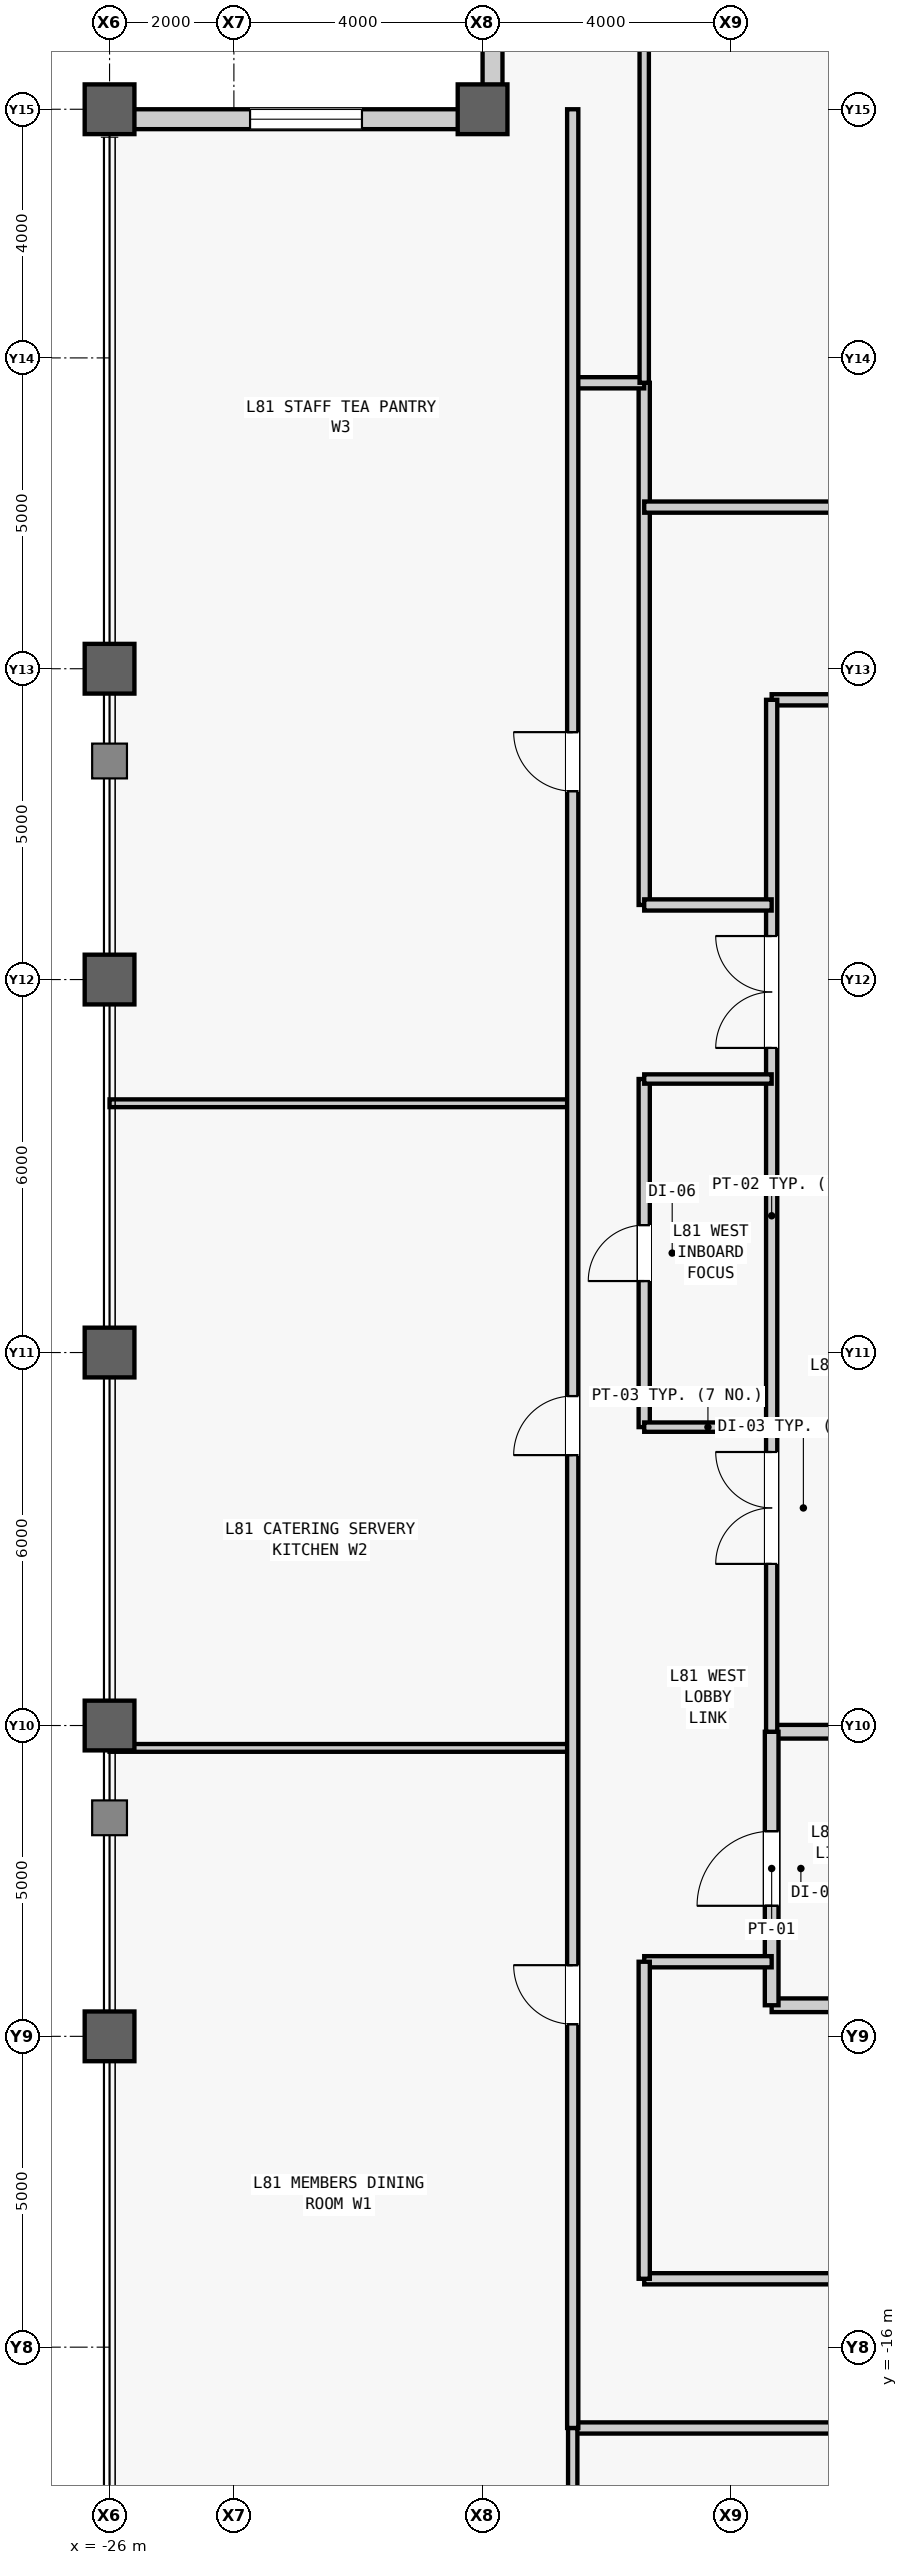
"""IFC4 building model, lengths in metres.
Left out: names, types, materials, properties, quantities, classifications, styles, units other than length and angle.
Written with IfcOpenShell. Run it as: python <this file> out.ifc"""

import sys

from ifc_helpers import new_model, si_unit, direction, frame, frame_2d, origin, origin_2d, place, context, subcontext, project, spatial, rectangle, hollow_rectangle, extrude, source, transform, mapped, element, fill, save


model = new_model("IFC4")
c1 = context("Model", 3, precision=1e-05, world=origin(), true_north=direction((0.0, 1.0)))
c2 = subcontext(c1, "Body", "Model", "MODEL_VIEW")
j1 = project(units=[si_unit("LENGTHUNIT", "METRE"), si_unit("PLANEANGLEUNIT", "RADIAN")], contexts=[c1])
p1 = place(None, origin())
s1 = spatial("IfcSite", under=j1, at=p1, CompositionType="ELEMENT")
p2 = place(p1, origin())
s2 = spatial("IfcBuilding", under=s1, at=p2, CompositionType="ELEMENT")
p3 = place(p2, frame((0.0, 0.0, 342.3)))
s3 = spatial("IfcBuildingStorey", under=s2, at=p3, CompositionType="ELEMENT", Elevation=342.3)
m1 = source(origin(), c2, "Body", "SweptSolid", [
    extrude(hollow_rectangle(XDim=0.8, YDim=0.8, WallThickness=0.045, at=origin_2d()), origin(), (0.0, 0.0, 1.0), 4.0),
])
for number, where, z_axis, x_axis in (
    (1, (-26.0, -11.0, 0.0), (0.0, 0.0, 1.0), (1.0, 0.0, 0.0)),
    (2, (-26.0, -6.0, 0.0), (0.0, 0.0, 1.0), (1.0, 0.0, 0.0)),
    (3, (-26.0, 0.0, 0.0), (0.0, 0.0, 1.0), (1.0, 0.0, 0.0)),
    (4, (-26.0, 6.0, 0.0), (0.0, 0.0, 1.0), (1.0, 0.0, 0.0)),
    (5, (-26.0, 11.0, 0.0), (0.0, 0.0, 1.0), (1.0, 0.0, 0.0)),
    (6, (-26.0, 20.0, 0.0), (0.0, 0.0, 1.0), (1.0, 0.0, 0.0)),
    (7, (-20.0, 20.0, 0.0), (0.0, 0.0, 1.0), (1.0, 0.0, 0.0)),
):
    element("IfcColumn", number, at=place(p3, frame(where, z_axis=z_axis, x_axis=x_axis)), inside=s3, PredefinedType="COLUMN", context=c2, shape_type="MappedRepresentation", body=[
        mapped(m1, transform((0.0, 0.0, 0.0), scale=1.0)),
    ])
m2 = source(origin(), c2, "Body", "SweptSolid", [
    extrude(rectangle(XDim=5.68, YDim=0.32, at=frame_2d((2.84, 0.0))), origin(), (0.0, 0.0, 1.0), 3.151),
])
p4 = place(p3, frame((-19.84, 20.0, 0.0), z_axis=(0.0, 0.0, 1.0), x_axis=(0.0, 1.0, 0.0)))
e8 = element("IfcWall", 8, at=p4, inside=s3, PredefinedType="STANDARD", context=c2, shape_type="MappedRepresentation", body=[
    mapped(m2, transform((0.0, 0.0, 0.0), scale=1.0)),
])
m3 = source(origin(), c2, "Body", "SweptSolid", [
    extrude(rectangle(XDim=1.8, YDim=2.4, at=frame_2d((0.9, 1.2))), frame((0.0, 0.17, 0.0), z_axis=(0.0, -1.0, 0.0), x_axis=(1.0, 0.0, 0.0)), (0.0, 0.0, 1.0), 0.34),
])
p5 = place(p4, frame((1.94, 0.0, 0.5)))
e9 = element("IfcOpeningElement", 9, at=p5, cuts=e8, PredefinedType="OPENING", context=c2, shape_type="MappedRepresentation", body=[
    mapped(m3, transform((0.0, 0.0, 0.0), scale=1.0)),
])
p6 = place(p3, frame((-20.0, 19.84, 0.0), z_axis=(0.0, 0.0, 1.0), x_axis=(-1.0, 0.0, 0.0)))
e10 = element("IfcWall", 10, at=p6, inside=s3, PredefinedType="STANDARD", context=c2, shape_type="MappedRepresentation", body=[
    mapped(m2, transform((0.0, 0.0, 0.0), scale=1.0)),
])
p7 = place(p6, frame((1.94, 0.0, 0.5)))
e11 = element("IfcOpeningElement", 11, at=p7, cuts=e10, PredefinedType="OPENING", context=c2, shape_type="MappedRepresentation", body=[
    mapped(m3, transform((0.0, 0.0, 0.0), scale=1.0)),
])
m4 = source(origin(), c2, "Body", "SweptSolid", [
    extrude(rectangle(XDim=4.05, YDim=0.22, at=frame_2d((2.025, 0.0))), origin(), (0.0, 0.0, 1.0), 3.7),
])
p8 = place(p3, frame((-15.35, -10.5, 0.0), z_axis=(0.0, 0.0, 1.0), x_axis=(1.0, 0.0, 0.0)))
e12 = element("IfcWall", 12, at=p8, inside=s3, PredefinedType="PARTITIONING", context=c2, shape_type="MappedRepresentation", body=[
    mapped(m4, transform((0.0, 0.0, 0.0), scale=1.0)),
])
m5 = source(origin(), c2, "Body", "SweptSolid", [
    extrude(rectangle(XDim=4.05, YDim=0.22, at=frame_2d((2.025, 0.0))), origin(), (0.0, 0.0, 1.0), 3.084),
])
p9 = place(p3, frame((-15.35, -6.1, 0.0), z_axis=(0.0, 0.0, 1.0), x_axis=(1.0, 0.0, 0.0)))
e13 = element("IfcWall", 13, at=p9, inside=s3, PredefinedType="PARTITIONING", context=c2, shape_type="MappedRepresentation", body=[
    mapped(m5, transform((0.0, 0.0, 0.0), scale=1.0)),
])
m6 = source(origin(), c2, "Body", "SweptSolid", [
    extrude(rectangle(XDim=4.4, YDim=0.22, at=frame_2d((2.2, 0.0))), origin(), (0.0, 0.0, 1.0), 3.7),
])
p10 = place(p3, frame((-15.35, -10.5, 0.0), z_axis=(0.0, 0.0, 1.0), x_axis=(0.0, 1.0, 0.0)))
e14 = element("IfcWall", 14, at=p10, inside=s3, PredefinedType="PARTITIONING", context=c2, shape_type="MappedRepresentation", body=[
    mapped(m6, transform((0.0, 0.0, 0.0), scale=1.0)),
])
m7 = source(origin(), c2, "Body", "SweptSolid", [
    extrude(rectangle(XDim=1.2, YDim=2.2, at=frame_2d((0.6, 1.1))), frame((0.0, 0.12, 0.0), z_axis=(0.0, -1.0, 0.0), x_axis=(1.0, 0.0, 0.0)), (0.0, 0.0, 1.0), 0.24),
])
p11 = place(p10, frame((1.6, 0.0, 0.0)))
e15 = element("IfcOpeningElement", 15, at=p11, cuts=e14, PredefinedType="OPENING", context=c2, shape_type="MappedRepresentation", body=[
    mapped(m7, transform((0.0, 0.0, 0.0), scale=1.0)),
])
m8 = source(origin(), c2, "Body", "SweptSolid", [
    extrude(rectangle(XDim=4.05, YDim=0.18, at=frame_2d((2.025, 0.0))), origin(), (0.0, 0.0, 1.0), 3.7),
])
p12 = place(p3, frame((-15.35, 10.5, 0.0), z_axis=(0.0, 0.0, 1.0), x_axis=(1.0, 0.0, 0.0)))
e16 = element("IfcWall", 16, at=p12, inside=s3, PredefinedType="PARTITIONING", context=c2, shape_type="MappedRepresentation", body=[
    mapped(m8, transform((0.0, 0.0, 0.0), scale=1.0)),
])
m9 = source(origin(), c2, "Body", "SweptSolid", [
    extrude(rectangle(XDim=16.6, YDim=0.18, at=frame_2d((8.3, 0.0))), origin(), (0.0, 0.0, 1.0), 3.7),
])
p13 = place(p3, frame((-15.35, -6.1, 0.0), z_axis=(0.0, 0.0, 1.0), x_axis=(0.0, 1.0, 0.0)))
e17 = element("IfcWall", 17, at=p13, inside=s3, PredefinedType="PARTITIONING", context=c2, shape_type="MappedRepresentation", body=[
    mapped(m9, transform((0.0, 0.0, 0.0), scale=1.0)),
])
m10 = source(origin(), c2, "Body", "SweptSolid", [
    extrude(rectangle(XDim=1.8, YDim=2.25, at=frame_2d((0.9, 1.125))), frame((0.0, 0.1, 0.0), z_axis=(0.0, -1.0, 0.0), x_axis=(1.0, 0.0, 0.0)), (0.0, 0.0, 1.0), 0.2),
])
p14 = place(p13, frame((2.7, 0.0, 0.0)))
e18 = element("IfcOpeningElement", 18, at=p14, cuts=e17, PredefinedType="OPENING", context=c2, shape_type="MappedRepresentation", body=[
    mapped(m10, transform((0.0, 0.0, 0.0), scale=1.0)),
])
p15 = place(p13, frame((11.0, 0.0, 0.0)))
e19 = element("IfcOpeningElement", 19, at=p15, cuts=e17, PredefinedType="OPENING", context=c2, shape_type="MappedRepresentation", body=[
    mapped(m10, transform((0.0, 0.0, 0.0), scale=1.0)),
])
m11 = source(origin(), c2, "Body", "SweptSolid", [
    extrude(rectangle(XDim=5.6, YDim=0.18, at=frame_2d((2.8, 0.0))), origin(), (0.0, 0.0, 1.0), 3.7),
])
p16 = place(p3, frame((-17.4, -1.2, 0.0), z_axis=(0.0, 0.0, 1.0), x_axis=(0.0, 1.0, 0.0)))
e20 = element("IfcWall", 20, at=p16, inside=s3, PredefinedType="PARTITIONING", context=c2, shape_type="MappedRepresentation", body=[
    mapped(m11, transform((0.0, 0.0, 0.0), scale=1.0)),
])
m12 = source(origin(), c2, "Body", "SweptSolid", [
    extrude(rectangle(XDim=0.9, YDim=2.15, at=frame_2d((0.45, 1.075))), frame((0.0, 0.1, 0.0), z_axis=(0.0, -1.0, 0.0), x_axis=(1.0, 0.0, 0.0)), (0.0, 0.0, 1.0), 0.2),
])
p17 = place(p16, frame((2.35, 0.0, 0.0)))
e21 = element("IfcOpeningElement", 21, at=p17, cuts=e20, PredefinedType="OPENING", context=c2, shape_type="MappedRepresentation", body=[
    mapped(m12, transform((0.0, 0.0, 0.0), scale=1.0)),
])
m13 = source(origin(), c2, "Body", "SweptSolid", [
    extrude(rectangle(XDim=2.05, YDim=0.15, at=frame_2d((1.025, 0.0))), origin(), (0.0, 0.0, 1.0), 3.7),
])
for number, where, z_axis, x_axis in (
    (22, (-17.4, -1.2, 0.0), (0.0, 0.0, 1.0), (1.0, 0.0, 0.0)),
    (23, (-17.4, 4.4, 0.0), (0.0, 0.0, 1.0), (1.0, 0.0, 0.0)),
):
    element("IfcWall", number, at=place(p3, frame(where, z_axis=z_axis, x_axis=x_axis)), inside=s3, PredefinedType="PARTITIONING", context=c2, shape_type="MappedRepresentation", body=[
        mapped(m13, transform((0.0, 0.0, 0.0), scale=1.0)),
    ])
m14 = source(origin(), c2, "Body", "SweptSolid", [
    extrude(rectangle(XDim=2.05, YDim=0.18, at=frame_2d((1.025, 0.0))), origin(), (0.0, 0.0, 1.0), 3.7),
])
p18 = place(p3, frame((-17.4, -9.8, 0.0), z_axis=(0.0, 0.0, 1.0), x_axis=(1.0, 0.0, 0.0)))
e24 = element("IfcWall", 24, at=p18, inside=s3, PredefinedType="PARTITIONING", context=c2, shape_type="MappedRepresentation", body=[
    mapped(m14, transform((0.0, 0.0, 0.0), scale=1.0)),
])
m15 = source(origin(), c2, "Body", "SweptSolid", [
    extrude(rectangle(XDim=8.4, YDim=0.18, at=frame_2d((4.2, 0.0))), origin(), (0.0, 0.0, 1.0), 3.7),
])
p19 = place(p3, frame((-17.4, 7.2, 0.0), z_axis=(0.0, 0.0, 1.0), x_axis=(0.0, 1.0, 0.0)))
e25 = element("IfcWall", 25, at=p19, inside=s3, PredefinedType="PARTITIONING", context=c2, shape_type="MappedRepresentation", body=[
    mapped(m15, transform((0.0, 0.0, 0.0), scale=1.0)),
])
p20 = place(p3, frame((-17.4, 7.2, 0.0), z_axis=(0.0, 0.0, 1.0), x_axis=(1.0, 0.0, 0.0)))
e26 = element("IfcWall", 26, at=p20, inside=s3, PredefinedType="PARTITIONING", context=c2, shape_type="MappedRepresentation", body=[
    mapped(m14, transform((0.0, 0.0, 0.0), scale=1.0)),
])
m16 = source(origin(), c2, "Body", "SweptSolid", [
    extrude(rectangle(XDim=16.1, YDim=0.18, at=frame_2d((8.05, 0.0))), origin(), (0.0, 0.0, 1.0), 3.7),
])
p21 = place(p3, frame((-17.4, -14.9, 0.0), z_axis=(0.0, 0.0, 1.0), x_axis=(1.0, 0.0, 0.0)))
e27 = element("IfcWall", 27, at=p21, inside=s3, PredefinedType="PARTITIONING", context=c2, shape_type="MappedRepresentation", body=[
    mapped(m16, transform((0.0, 0.0, 0.0), scale=1.0)),
])
p22 = place(p21, frame((8.95, 0.0, 0.0)))
e28 = element("IfcOpeningElement", 28, at=p22, cuts=e27, PredefinedType="OPENING", context=c2, shape_type="MappedRepresentation", body=[
    mapped(m12, transform((0.0, 0.0, 0.0), scale=1.0)),
])
m17 = source(origin(), c2, "Body", "SweptSolid", [
    extrude(rectangle(XDim=5.1, YDim=0.18, at=frame_2d((2.55, 0.0))), origin(), (0.0, 0.0, 1.0), 3.7),
])
p23 = place(p3, frame((-17.4, -14.9, 0.0), z_axis=(0.0, 0.0, 1.0), x_axis=(0.0, 1.0, 0.0)))
e29 = element("IfcWall", 29, at=p23, inside=s3, PredefinedType="PARTITIONING", context=c2, shape_type="MappedRepresentation", body=[
    mapped(m17, transform((0.0, 0.0, 0.0), scale=1.0)),
])
m18 = source(origin(), c2, "Body", "SweptSolid", [
    extrude(rectangle(XDim=1.15, YDim=0.18, at=frame_2d((0.575, 0.0))), origin(), (0.0, 0.0, 1.0), 3.7),
])
p24 = place(p3, frame((-18.55, 15.6, 0.0), z_axis=(0.0, 0.0, 1.0), x_axis=(1.0, 0.0, 0.0)))
e30 = element("IfcWall", 30, at=p24, inside=s3, PredefinedType="PARTITIONING", context=c2, shape_type="MappedRepresentation", body=[
    mapped(m18, transform((0.0, 0.0, 0.0), scale=1.0)),
])
m19 = source(origin(), c2, "Body", "SweptSolid", [
    extrude(rectangle(XDim=36.3, YDim=0.18, at=frame_2d((18.15, 0.0))), origin(), (0.0, 0.0, 1.0), 3.7),
])
p25 = place(p3, frame((-18.55, -17.3, 0.0), z_axis=(0.0, 0.0, 1.0), x_axis=(1.0, 0.0, 0.0)))
e31 = element("IfcWall", 31, at=p25, inside=s3, PredefinedType="PARTITIONING", context=c2, shape_type="MappedRepresentation", body=[
    mapped(m19, transform((0.0, 0.0, 0.0), scale=1.0)),
])
m20 = source(origin(), c2, "Body", "SweptSolid", [
    extrude(rectangle(XDim=1.05, YDim=2.2, at=frame_2d((0.525, 1.1))), frame((0.0, 0.1, 0.0), z_axis=(0.0, -1.0, 0.0), x_axis=(1.0, 0.0, 0.0)), (0.0, 0.0, 1.0), 0.2),
])
p26 = place(p25, frame((9.05, 0.0, 0.0)))
e32 = element("IfcOpeningElement", 32, at=p26, cuts=e31, PredefinedType="OPENING", context=c2, shape_type="MappedRepresentation", body=[
    mapped(m20, transform((0.0, 0.0, 0.0), scale=1.0)),
])
p27 = place(p25, frame((26.175, 0.0, 0.0)))
e33 = element("IfcOpeningElement", 33, at=p27, cuts=e31, PredefinedType="OPENING", context=c2, shape_type="MappedRepresentation", body=[
    mapped(m20, transform((0.0, 0.0, 0.0), scale=1.0)),
])
m21 = source(origin(), c2, "Body", "SweptSolid", [
    extrude(rectangle(XDim=8.7, YDim=0.15, at=frame_2d((4.35, 0.0))), origin(), (0.0, 0.0, 1.0), 3.7),
])
p28 = place(p3, frame((-18.55, -26.0, 0.0), z_axis=(0.0, 0.0, 1.0), x_axis=(0.0, 1.0, 0.0)))
e34 = element("IfcWall", 34, at=p28, inside=s3, PredefinedType="PARTITIONING", context=c2, shape_type="MappedRepresentation", body=[
    mapped(m21, transform((0.0, 0.0, 0.0), scale=1.0)),
])
m22 = source(origin(), c2, "Body", "SweptSolid", [
    extrude(rectangle(XDim=32.75, YDim=0.18, at=frame_2d((16.375, 0.0))), origin(), (0.0, 0.0, 1.0), 3.7),
])
p29 = place(p3, frame((-17.4, 13.6, 0.0), z_axis=(0.0, 0.0, 1.0), x_axis=(1.0, 0.0, 0.0)))
e35 = element("IfcWall", 35, at=p29, inside=s3, PredefinedType="PARTITIONING", context=c2, shape_type="MappedRepresentation", body=[
    mapped(m22, transform((0.0, 0.0, 0.0), scale=1.0)),
])
p30 = place(p29, frame((27.075, 0.0, 0.0)))
e36 = element("IfcOpeningElement", 36, at=p30, cuts=e35, PredefinedType="OPENING", context=c2, shape_type="MappedRepresentation", body=[
    mapped(m20, transform((0.0, 0.0, 0.0), scale=1.0)),
])
m23 = source(origin(), c2, "Body", "SweptSolid", [
    extrude(rectangle(XDim=10.4, YDim=0.15, at=frame_2d((5.2, 0.0))), origin(), (0.0, 0.0, 1.0), 3.7),
])
p31 = place(p3, frame((-17.4, 15.6, 0.0), z_axis=(0.0, 0.0, 1.0), x_axis=(0.0, 1.0, 0.0)))
e37 = element("IfcWall", 37, at=p31, inside=s3, PredefinedType="PARTITIONING", context=c2, shape_type="MappedRepresentation", body=[
    mapped(m23, transform((0.0, 0.0, 0.0), scale=1.0)),
])
m24 = source(origin(), c2, "Body", "SweptSolid", [
    extrude(rectangle(XDim=7.45, YDim=0.125, at=frame_2d((3.725, 0.0))), origin(), (0.0, 0.0, 1.0), 3.7),
])
for number, where, z_axis, x_axis in (
    (38, (-26.0, -6.36, 0.0), (0.0, 0.0, 1.0), (1.0, 0.0, 0.0)),
    (39, (-26.0, 4.01, 0.0), (0.0, 0.0, 1.0), (1.0, 0.0, 0.0)),
):
    element("IfcWall", number, at=place(p3, frame(where, z_axis=z_axis, x_axis=x_axis)), inside=s3, PredefinedType="PARTITIONING", context=c2, shape_type="MappedRepresentation", body=[
        mapped(m24, transform((0.0, 0.0, 0.0), scale=1.0)),
    ])
m25 = source(origin(), c2, "Body", "SweptSolid", [
    extrude(rectangle(XDim=37.3, YDim=0.18, at=frame_2d((18.65, 0.0))), origin(), (0.0, 0.0, 1.0), 3.7),
])
p32 = place(p3, frame((-18.55, -17.3, 0.0), z_axis=(0.0, 0.0, 1.0), x_axis=(0.0, 1.0, 0.0)))
e40 = element("IfcWall", 40, at=p32, inside=s3, PredefinedType="PARTITIONING", context=c2, shape_type="MappedRepresentation", body=[
    mapped(m25, transform((0.0, 0.0, 0.0), scale=1.0)),
])
m26 = source(origin(), c2, "Body", "SweptSolid", [
    extrude(rectangle(XDim=0.95, YDim=2.15, at=frame_2d((0.475, 1.075))), frame((0.0, 0.1, 0.0), z_axis=(0.0, -1.0, 0.0), x_axis=(1.0, 0.0, 0.0)), (0.0, 0.0, 1.0), 0.2),
])
p33 = place(p32, frame((6.495, 0.0, 0.0)))
e41 = element("IfcOpeningElement", 41, at=p33, cuts=e40, PredefinedType="OPENING", context=c2, shape_type="MappedRepresentation", body=[
    mapped(m26, transform((0.0, 0.0, 0.0), scale=1.0)),
])
p34 = place(p32, frame((15.65, 0.0, 0.0)))
e42 = element("IfcOpeningElement", 42, at=p34, cuts=e40, PredefinedType="OPENING", context=c2, shape_type="MappedRepresentation", body=[
    mapped(m26, transform((0.0, 0.0, 0.0), scale=1.0)),
])
p35 = place(p32, frame((26.33, 0.0, 0.0)))
e43 = element("IfcOpeningElement", 43, at=p35, cuts=e40, PredefinedType="OPENING", context=c2, shape_type="MappedRepresentation", body=[
    mapped(m26, transform((0.0, 0.0, 0.0), scale=1.0)),
])
m27 = source(origin(), c2, "Body", "SweptSolid", [
    extrude(rectangle(XDim=1.8, YDim=2.4, at=frame_2d((0.9, 1.2))), frame((0.0, 0.03, 0.0), z_axis=(0.0, -1.0, 0.0), x_axis=(1.0, 0.0, 0.0)), (0.0, 0.0, 1.0), 0.06),
])
p36 = place(p7, origin())
e44 = element("IfcWindow", 44, at=p36, inside=s3, PartitioningType="SINGLE_PANEL", PredefinedType="WINDOW", context=c2, shape_type="MappedRepresentation", body=[
    mapped(m27, transform((0.0, 0.0, 0.0), scale=1.0)),
])
fill(e11, e44)
m28 = source(origin(), c2, "Body", "SweptSolid", [
    extrude(rectangle(XDim=1.2, YDim=2.2, at=frame_2d((0.6, 1.1))), frame((0.0, 0.025, 0.0), z_axis=(0.0, -1.0, 0.0), x_axis=(1.0, 0.0, 0.0)), (0.0, 0.0, 1.0), 0.05),
])
p37 = place(p11, origin())
e45 = element("IfcDoor", 45, at=p37, inside=s3, OperationType="SINGLE_SWING_LEFT", PredefinedType="DOOR", context=c2, shape_type="MappedRepresentation", body=[
    mapped(m28, transform((0.0, 0.0, 0.0), scale=1.0)),
])
fill(e15, e45)
m29 = source(origin(), c2, "Body", "SweptSolid", [
    extrude(rectangle(XDim=1.8, YDim=2.25, at=frame_2d((0.9, 1.125))), frame((0.0, 0.025, 0.0), z_axis=(0.0, -1.0, 0.0), x_axis=(1.0, 0.0, 0.0)), (0.0, 0.0, 1.0), 0.05),
])
p38 = place(p14, origin())
e46 = element("IfcDoor", 46, at=p38, inside=s3, OperationType="SINGLE_SWING_LEFT", PredefinedType="DOOR", context=c2, shape_type="MappedRepresentation", body=[
    mapped(m29, transform((0.0, 0.0, 0.0), scale=1.0)),
])
fill(e18, e46)
p39 = place(p15, origin())
e47 = element("IfcDoor", 47, at=p39, inside=s3, OperationType="SINGLE_SWING_RIGHT", PredefinedType="DOOR", context=c2, shape_type="MappedRepresentation", body=[
    mapped(m29, transform((0.0, 0.0, 0.0), scale=1.0)),
])
fill(e19, e47)
m30 = source(origin(), c2, "Body", "SweptSolid", [
    extrude(rectangle(XDim=0.9, YDim=2.15, at=frame_2d((0.45, 1.075))), frame((0.0, 0.025, 0.0), z_axis=(0.0, -1.0, 0.0), x_axis=(1.0, 0.0, 0.0)), (0.0, 0.0, 1.0), 0.05),
])
p40 = place(p17, origin())
e48 = element("IfcDoor", 48, at=p40, inside=s3, OperationType="SINGLE_SWING_LEFT", PredefinedType="DOOR", context=c2, shape_type="MappedRepresentation", body=[
    mapped(m30, transform((0.0, 0.0, 0.0), scale=1.0)),
])
fill(e21, e48)
m31 = source(origin(), c2, "Body", "SweptSolid", [
    extrude(rectangle(XDim=0.95, YDim=2.15, at=frame_2d((0.475, 1.075))), frame((0.0, 0.025, 0.0), z_axis=(0.0, -1.0, 0.0), x_axis=(1.0, 0.0, 0.0)), (0.0, 0.0, 1.0), 0.05),
])
p41 = place(p33, origin())
e49 = element("IfcDoor", 49, at=p41, inside=s3, OperationType="SINGLE_SWING_RIGHT", PredefinedType="DOOR", context=c2, shape_type="MappedRepresentation", body=[
    mapped(m31, transform((0.0, 0.0, 0.0), scale=1.0)),
])
fill(e41, e49)
p42 = place(p34, origin())
e50 = element("IfcDoor", 50, at=p42, inside=s3, OperationType="SINGLE_SWING_LEFT", PredefinedType="DOOR", context=c2, shape_type="MappedRepresentation", body=[
    mapped(m31, transform((0.0, 0.0, 0.0), scale=1.0)),
])
fill(e42, e50)
p43 = place(p35, origin())
e51 = element("IfcDoor", 51, at=p43, inside=s3, OperationType="SINGLE_SWING_RIGHT", PredefinedType="DOOR", context=c2, shape_type="MappedRepresentation", body=[
    mapped(m31, transform((0.0, 0.0, 0.0), scale=1.0)),
])
fill(e43, e51)
save(model, sys.argv[1])
